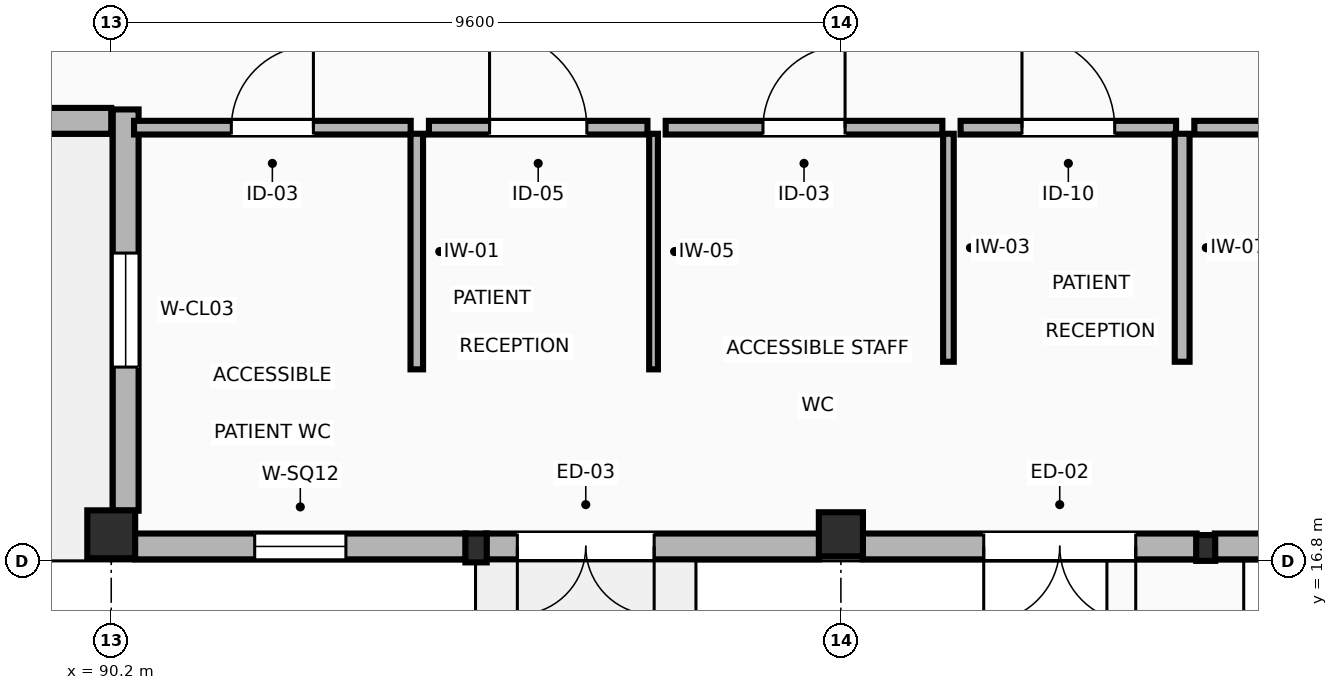
"""IFC4 building model, lengths in metres.
Left out: names, types, materials, properties, quantities, classifications, styles, units other than length and angle.
Written with IfcOpenShell. Run it as: python <this file> out.ifc"""

import sys

from ifc_helpers import new_model, si_unit, direction, frame, frame_2d, origin, origin_2d, place, context, subcontext, project, spatial, rectangle, extrude, element, fill, save


model = new_model("IFC4")
c1 = context("Model", 3, precision=1e-05, world=origin(), true_north=direction((0.0, 1.0)))
c2 = subcontext(c1, "Body", "Model", "MODEL_VIEW")
j1 = project(units=[si_unit("LENGTHUNIT", "METRE"), si_unit("PLANEANGLEUNIT", "RADIAN")], contexts=[c1])
p1 = place(None, origin())
s1 = spatial("IfcSite", under=j1, at=p1, CompositionType="ELEMENT")
p2 = place(p1, origin())
s2 = spatial("IfcBuilding", under=s1, at=p2, CompositionType="ELEMENT")
p3 = place(p2, origin())
s3 = spatial("IfcBuildingStorey", under=s2, at=p3, CompositionType="ELEMENT", Elevation=0.0)
p4 = place(p3, frame((90.2, 17.15, 0.0), z_axis=(0.0, 0.0, 1.0), x_axis=(1.0, 0.0, 0.0)))
e1 = element("IfcColumn", 1, at=p4, inside=s3, PredefinedType="COLUMN", context=c2, shape_type="SweptSolid", body=[
    extrude(rectangle(XDim=0.63, YDim=0.63, at=origin_2d()), origin(), (0.0, 0.0, 1.0), 5.4),
])
p5 = place(p3, frame((99.8, 17.15, 0.0), z_axis=(0.0, 0.0, 1.0), x_axis=(1.0, 0.0, 0.0)))
e2 = element("IfcColumn", 2, at=p5, inside=s3, PredefinedType="COLUMN", context=c2, shape_type="SweptSolid", body=[
    extrude(rectangle(XDim=0.58, YDim=0.58, at=origin_2d()), origin(), (0.0, 0.0, 1.0), 5.4),
])
p6 = place(p3, frame((95.0, 16.97, -1.75), z_axis=(0.0, 0.0, 1.0), x_axis=(1.0, 0.0, 0.0)))
e3 = element("IfcColumn", 3, at=p6, inside=s3, PredefinedType="PILASTER", context=c2, shape_type="SweptSolid", body=[
    extrude(rectangle(XDim=0.28, YDim=0.38, at=origin_2d()), origin(), (0.0, 0.0, 1.0), 7.15),
])
p7 = place(p3, frame((104.6, 16.97, -1.75), z_axis=(0.0, 0.0, 1.0), x_axis=(1.0, 0.0, 0.0)))
e4 = element("IfcColumn", 4, at=p7, inside=s3, PredefinedType="PILASTER", context=c2, shape_type="SweptSolid", body=[
    extrude(rectangle(XDim=0.25, YDim=0.34, at=origin_2d()), origin(), (0.0, 0.0, 1.0), 7.15),
])
p8 = place(p3, frame((80.6, 22.59, 0.0), z_axis=(0.0, 0.0, 1.0), x_axis=(1.0, 0.0, 0.0)))
e5 = element("IfcWall", 5, at=p8, inside=s3, PredefinedType="STANDARD", context=c2, shape_type="SweptSolid", body=[
    extrude(rectangle(XDim=9.6, YDim=0.34, at=frame_2d((4.8, 0.0))), origin(), (0.0, 0.0, 1.0), 5.12),
])
p9 = place(p8, frame((3.7, 0.0, 0.0)))
e6 = element("IfcOpeningElement", 6, at=p9, cuts=e5, PredefinedType="OPENING", context=c2, shape_type="SweptSolid", body=[
    extrude(rectangle(XDim=2.2, YDim=2.5, at=frame_2d((1.1, 1.25))), frame((0.0, 0.18, 0.0), z_axis=(0.0, -1.0, 0.0), x_axis=(1.0, 0.0, 0.0)), (0.0, 0.0, 1.0), 0.36),
])
p10 = place(p3, frame((90.39, 22.74, 0.0), z_axis=(0.0, 0.0, 1.0), x_axis=(0.0, -1.0, 0.0)))
e7 = element("IfcWall", 7, at=p10, inside=s3, PredefinedType="STANDARD", context=c2, shape_type="SweptSolid", body=[
    extrude(rectangle(XDim=5.28, YDim=0.34, at=frame_2d((2.64, 0.0))), origin(), (0.0, 0.0, 1.0), 4.605),
])
p11 = place(p10, frame((1.89, 0.0, 0.95)))
e8 = element("IfcOpeningElement", 8, at=p11, cuts=e7, PredefinedType="OPENING", context=c2, shape_type="SweptSolid", body=[
    extrude(rectangle(XDim=1.5, YDim=1.65, at=frame_2d((0.75, 0.825))), frame((0.0, 0.18, 0.0), z_axis=(0.0, -1.0, 0.0), x_axis=(1.0, 0.0, 0.0)), (0.0, 0.0, 1.0), 0.36),
])
p12 = place(p3, frame((90.51, 16.99, 0.0), z_axis=(0.0, 0.0, 1.0), x_axis=(1.0, 0.0, 0.0)))
e9 = element("IfcWall", 9, at=p12, inside=s3, PredefinedType="STANDARD", context=c2, shape_type="SweptSolid", body=[
    extrude(rectangle(XDim=4.355, YDim=0.34, at=frame_2d((2.177, 0.0))), origin(), (0.0, 0.0, 1.0), 4.415),
])
p13 = place(p12, frame((1.577, 0.0, 1.35)))
e10 = element("IfcOpeningElement", 10, at=p13, cuts=e9, PredefinedType="OPENING", context=c2, shape_type="SweptSolid", body=[
    extrude(rectangle(XDim=1.2, YDim=1.2, at=frame_2d((0.6, 0.6))), frame((0.0, 0.18, 0.0), z_axis=(0.0, -1.0, 0.0), x_axis=(1.0, 0.0, 0.0)), (0.0, 0.0, 1.0), 0.36),
])
p14 = place(p3, frame((95.135, 16.99, 0.0), z_axis=(0.0, 0.0, 1.0), x_axis=(1.0, 0.0, 0.0)))
e11 = element("IfcWall", 11, at=p14, inside=s3, PredefinedType="STANDARD", context=c2, shape_type="SweptSolid", body=[
    extrude(rectangle(XDim=4.38, YDim=0.34, at=frame_2d((2.19, 0.0))), origin(), (0.0, 0.0, 1.0), 4.415),
])
p15 = place(p14, frame((0.408, 0.0, 0.0)))
e12 = element("IfcOpeningElement", 12, at=p15, cuts=e11, PredefinedType="OPENING", context=c2, shape_type="SweptSolid", body=[
    extrude(rectangle(XDim=1.8, YDim=2.3, at=frame_2d((0.9, 1.15))), frame((0.0, 0.18, 0.0), z_axis=(0.0, -1.0, 0.0), x_axis=(1.0, 0.0, 0.0)), (0.0, 0.0, 1.0), 0.36),
])
p16 = place(p3, frame((100.085, 16.99, 0.0), z_axis=(0.0, 0.0, 1.0), x_axis=(1.0, 0.0, 0.0)))
e13 = element("IfcWall", 13, at=p16, inside=s3, PredefinedType="STANDARD", context=c2, shape_type="SweptSolid", body=[
    extrude(rectangle(XDim=4.395, YDim=0.34, at=frame_2d((2.198, 0.0))), origin(), (0.0, 0.0, 1.0), 4.385),
])
p17 = place(p16, frame((1.594, 0.0, 0.0)))
e14 = element("IfcOpeningElement", 14, at=p17, cuts=e13, PredefinedType="OPENING", context=c2, shape_type="SweptSolid", body=[
    extrude(rectangle(XDim=2.0, YDim=2.4, at=frame_2d((1.0, 1.2))), frame((0.0, 0.18, 0.0), z_axis=(0.0, -1.0, 0.0), x_axis=(1.0, 0.0, 0.0)), (0.0, 0.0, 1.0), 0.36),
])
p18 = place(p3, frame((104.72, 16.99, 0.0), z_axis=(0.0, 0.0, 1.0), x_axis=(1.0, 0.0, 0.0)))
e15 = element("IfcWall", 15, at=p18, inside=s3, PredefinedType="STANDARD", context=c2, shape_type="SweptSolid", body=[
    extrude(rectangle(XDim=4.45, YDim=0.34, at=frame_2d((2.225, 0.0))), origin(), (0.0, 0.0, 1.0), 4.385),
])
p19 = place(p3, frame((94.22, 22.42, 0.0), z_axis=(0.0, 0.0, 1.0), x_axis=(0.0, -1.0, 0.0)))
e16 = element("IfcWall", 16, at=p19, inside=s3, PredefinedType="PARTITIONING", context=c2, shape_type="SweptSolid", body=[
    extrude(rectangle(XDim=3.1, YDim=0.165, at=frame_2d((1.55, 0.0))), origin(), (0.0, 0.0, 1.0), 5.12),
])
p20 = place(p3, frame((90.5, 22.5, 0.0), z_axis=(0.0, 0.0, 1.0), x_axis=(1.0, 0.0, 0.0)))
e17 = element("IfcWall", 17, at=p20, inside=s3, PredefinedType="PARTITIONING", context=c2, shape_type="SweptSolid", body=[
    extrude(rectangle(XDim=3.64, YDim=0.18, at=frame_2d((1.82, 0.0))), origin(), (0.0, 0.0, 1.0), 5.12),
])
p21 = place(p20, frame((1.28, 0.0, 0.0)))
e18 = element("IfcOpeningElement", 18, at=p21, cuts=e17, PredefinedType="OPENING", context=c2, shape_type="SweptSolid", body=[
    extrude(rectangle(XDim=1.08, YDim=2.2, at=frame_2d((0.54, 1.1))), frame((0.0, 0.1, 0.0), z_axis=(0.0, -1.0, 0.0), x_axis=(1.0, 0.0, 0.0)), (0.0, 0.0, 1.0), 0.2),
])
p22 = place(p3, frame((94.38, 22.5, 0.0), z_axis=(0.0, 0.0, 1.0), x_axis=(1.0, 0.0, 0.0)))
e19 = element("IfcWall", 19, at=p22, inside=s3, PredefinedType="PARTITIONING", context=c2, shape_type="SweptSolid", body=[
    extrude(rectangle(XDim=2.875, YDim=0.18, at=frame_2d((1.438, 0.0))), origin(), (0.0, 0.0, 1.0), 5.12),
])
p23 = place(p22, frame((0.798, 0.0, 0.0)))
e20 = element("IfcOpeningElement", 20, at=p23, cuts=e19, PredefinedType="OPENING", context=c2, shape_type="SweptSolid", body=[
    extrude(rectangle(XDim=1.28, YDim=2.25, at=frame_2d((0.64, 1.125))), frame((0.0, 0.1, 0.0), z_axis=(0.0, -1.0, 0.0), x_axis=(1.0, 0.0, 0.0)), (0.0, 0.0, 1.0), 0.2),
])
p24 = place(p3, frame((97.335, 22.42, 0.0), z_axis=(0.0, 0.0, 1.0), x_axis=(0.0, -1.0, 0.0)))
e21 = element("IfcWall", 21, at=p24, inside=s3, PredefinedType="PARTITIONING", context=c2, shape_type="SweptSolid", body=[
    extrude(rectangle(XDim=3.1, YDim=0.115, at=frame_2d((1.55, 0.0))), origin(), (0.0, 0.0, 1.0), 5.12),
])
p25 = place(p3, frame((101.215, 22.42, 0.0), z_axis=(0.0, 0.0, 1.0), x_axis=(0.0, -1.0, 0.0)))
e22 = element("IfcWall", 22, at=p25, inside=s3, PredefinedType="PARTITIONING", context=c2, shape_type="SweptSolid", body=[
    extrude(rectangle(XDim=3.0, YDim=0.14, at=frame_2d((1.5, 0.0))), origin(), (0.0, 0.0, 1.0), 5.12),
])
p26 = place(p3, frame((97.495, 22.5, 0.0), z_axis=(0.0, 0.0, 1.0), x_axis=(1.0, 0.0, 0.0)))
e23 = element("IfcWall", 23, at=p26, inside=s3, PredefinedType="PARTITIONING", context=c2, shape_type="SweptSolid", body=[
    extrude(rectangle(XDim=3.64, YDim=0.18, at=frame_2d((1.82, 0.0))), origin(), (0.0, 0.0, 1.0), 5.12),
])
p27 = place(p26, frame((1.28, 0.0, 0.0)))
e24 = element("IfcOpeningElement", 24, at=p27, cuts=e23, PredefinedType="OPENING", context=c2, shape_type="SweptSolid", body=[
    extrude(rectangle(XDim=1.08, YDim=2.2, at=frame_2d((0.54, 1.1))), frame((0.0, 0.1, 0.0), z_axis=(0.0, -1.0, 0.0), x_axis=(1.0, 0.0, 0.0)), (0.0, 0.0, 1.0), 0.2),
])
p28 = place(p3, frame((101.375, 22.5, 0.0), z_axis=(0.0, 0.0, 1.0), x_axis=(1.0, 0.0, 0.0)))
e25 = element("IfcWall", 25, at=p28, inside=s3, PredefinedType="PARTITIONING", context=c2, shape_type="SweptSolid", body=[
    extrude(rectangle(XDim=2.835, YDim=0.18, at=frame_2d((1.417, 0.0))), origin(), (0.0, 0.0, 1.0), 5.12),
])
p29 = place(p28, frame((0.808, 0.0, 0.0)))
e26 = element("IfcOpeningElement", 26, at=p29, cuts=e25, PredefinedType="OPENING", context=c2, shape_type="SweptSolid", body=[
    extrude(rectangle(XDim=1.22, YDim=2.18, at=frame_2d((0.61, 1.09))), frame((0.0, 0.1, 0.0), z_axis=(0.0, -1.0, 0.0), x_axis=(1.0, 0.0, 0.0)), (0.0, 0.0, 1.0), 0.2),
])
p30 = place(p3, frame((104.29, 22.42, 0.0), z_axis=(0.0, 0.0, 1.0), x_axis=(0.0, -1.0, 0.0)))
e27 = element("IfcWall", 27, at=p30, inside=s3, PredefinedType="PARTITIONING", context=c2, shape_type="SweptSolid", body=[
    extrude(rectangle(XDim=3.0, YDim=0.195, at=frame_2d((1.5, 0.0))), origin(), (0.0, 0.0, 1.0), 5.12),
])
p31 = place(p3, frame((104.45, 22.5, 0.0), z_axis=(0.0, 0.0, 1.0), x_axis=(1.0, 0.0, 0.0)))
e28 = element("IfcWall", 28, at=p31, inside=s3, PredefinedType="PARTITIONING", context=c2, shape_type="SweptSolid", body=[
    extrude(rectangle(XDim=6.715, YDim=0.18, at=frame_2d((3.357, 0.0))), origin(), (0.0, 0.0, 1.0), 5.12),
])
p32 = place(p31, frame((2.798, 0.0, 0.0)))
e29 = element("IfcOpeningElement", 29, at=p32, cuts=e28, PredefinedType="OPENING", context=c2, shape_type="SweptSolid", body=[
    extrude(rectangle(XDim=1.12, YDim=2.16, at=frame_2d((0.56, 1.08))), frame((0.0, 0.1, 0.0), z_axis=(0.0, -1.0, 0.0), x_axis=(1.0, 0.0, 0.0)), (0.0, 0.0, 1.0), 0.2),
])
p33 = place(p11, origin())
e30 = element("IfcWindow", 30, at=p33, inside=s3, PartitioningType="SINGLE_PANEL", PredefinedType="WINDOW", context=c2, shape_type="SweptSolid", body=[
    extrude(rectangle(XDim=1.5, YDim=1.65, at=frame_2d((0.75, 0.825))), frame((0.0, 0.03, 0.0), z_axis=(0.0, -1.0, 0.0), x_axis=(1.0, 0.0, 0.0)), (0.0, 0.0, 1.0), 0.06),
])
fill(e8, e30)
p34 = place(p13, origin())
e31 = element("IfcWindow", 31, at=p34, inside=s3, PartitioningType="SINGLE_PANEL", PredefinedType="WINDOW", context=c2, shape_type="SweptSolid", body=[
    extrude(rectangle(XDim=1.2, YDim=1.2, at=frame_2d((0.6, 0.6))), frame((0.0, 0.03, 0.0), z_axis=(0.0, -1.0, 0.0), x_axis=(1.0, 0.0, 0.0)), (0.0, 0.0, 1.0), 0.06),
])
fill(e10, e31)
p35 = place(p15, frame((1.8, 0.0, 0.0), z_axis=(0.0, 0.0, 1.0), x_axis=(-1.0, 0.0, 0.0)))
e32 = element("IfcDoor", 32, at=p35, inside=s3, OperationType="DOUBLE_DOOR_SINGLE_SWING", PredefinedType="DOOR", context=c2, shape_type="SweptSolid", body=[
    extrude(rectangle(XDim=1.8, YDim=2.3, at=frame_2d((0.9, 1.15))), frame((0.0, 0.025, 0.0), z_axis=(0.0, -1.0, 0.0), x_axis=(1.0, 0.0, 0.0)), (0.0, 0.0, 1.0), 0.05),
])
fill(e12, e32)
p36 = place(p17, frame((2.0, 0.0, 0.0), z_axis=(0.0, 0.0, 1.0), x_axis=(-1.0, 0.0, 0.0)))
e33 = element("IfcDoor", 33, at=p36, inside=s3, OperationType="DOUBLE_DOOR_SINGLE_SWING", PredefinedType="DOOR", context=c2, shape_type="SweptSolid", body=[
    extrude(rectangle(XDim=2.0, YDim=2.4, at=frame_2d((1.0, 1.2))), frame((0.0, 0.025, 0.0), z_axis=(0.0, -1.0, 0.0), x_axis=(1.0, 0.0, 0.0)), (0.0, 0.0, 1.0), 0.05),
])
fill(e14, e33)
p37 = place(p21, origin())
e34 = element("IfcDoor", 34, at=p37, inside=s3, OperationType="SINGLE_SWING_RIGHT", PredefinedType="DOOR", context=c2, shape_type="SweptSolid", body=[
    extrude(rectangle(XDim=1.08, YDim=2.2, at=frame_2d((0.54, 1.1))), frame((0.0, 0.025, 0.0), z_axis=(0.0, -1.0, 0.0), x_axis=(1.0, 0.0, 0.0)), (0.0, 0.0, 1.0), 0.05),
])
fill(e18, e34)
p38 = place(p23, origin())
e35 = element("IfcDoor", 35, at=p38, inside=s3, OperationType="SINGLE_SWING_LEFT", PredefinedType="DOOR", context=c2, shape_type="SweptSolid", body=[
    extrude(rectangle(XDim=1.28, YDim=2.25, at=frame_2d((0.64, 1.125))), frame((0.0, 0.025, 0.0), z_axis=(0.0, -1.0, 0.0), x_axis=(1.0, 0.0, 0.0)), (0.0, 0.0, 1.0), 0.05),
])
fill(e20, e35)
p39 = place(p27, origin())
e36 = element("IfcDoor", 36, at=p39, inside=s3, OperationType="SINGLE_SWING_RIGHT", PredefinedType="DOOR", context=c2, shape_type="SweptSolid", body=[
    extrude(rectangle(XDim=1.08, YDim=2.2, at=frame_2d((0.54, 1.1))), frame((0.0, 0.025, 0.0), z_axis=(0.0, -1.0, 0.0), x_axis=(1.0, 0.0, 0.0)), (0.0, 0.0, 1.0), 0.05),
])
fill(e24, e36)
p40 = place(p29, origin())
e37 = element("IfcDoor", 37, at=p40, inside=s3, OperationType="SINGLE_SWING_LEFT", PredefinedType="DOOR", context=c2, shape_type="SweptSolid", body=[
    extrude(rectangle(XDim=1.22, YDim=2.18, at=frame_2d((0.61, 1.09))), frame((0.0, 0.025, 0.0), z_axis=(0.0, -1.0, 0.0), x_axis=(1.0, 0.0, 0.0)), (0.0, 0.0, 1.0), 0.05),
])
fill(e26, e37)
save(model, sys.argv[1])
